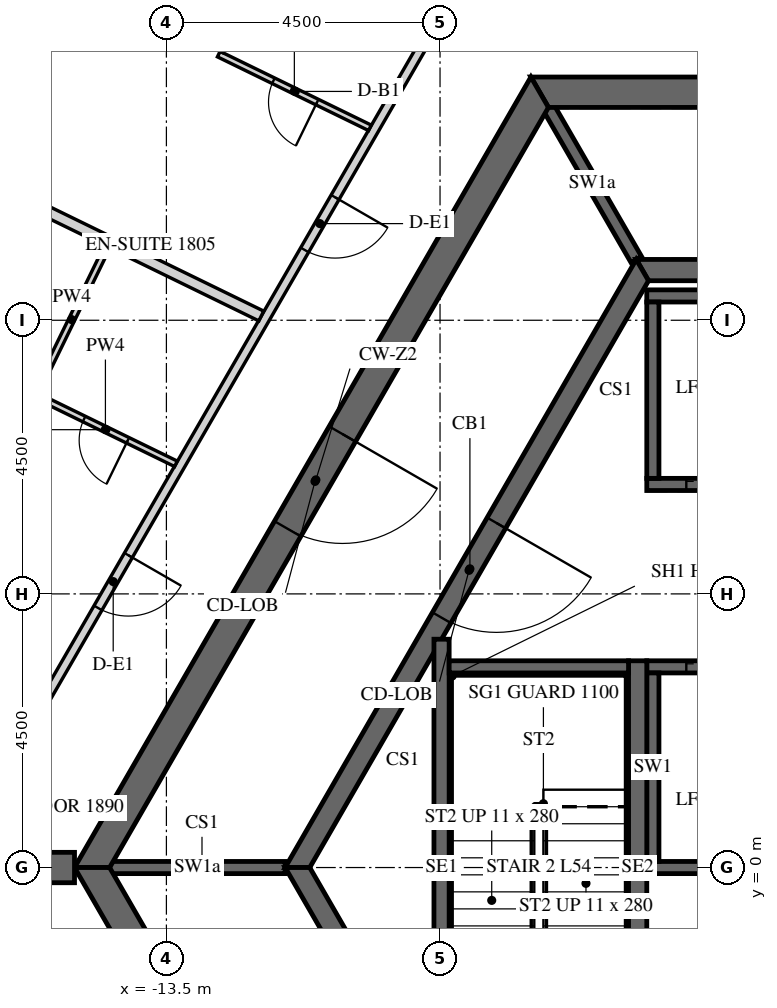
"""IFC4 building model, lengths in metres.
Left out: names, types, materials, properties, quantities, classifications, styles, units other than length and angle.
Written with IfcOpenShell. Run it as: python <this file> out.ifc"""

import sys

from ifc_helpers import new_model, si_unit, direction, frame, frame_2d, origin, place, context, subcontext, project, spatial, polyline, rectangle, outline, extrude, element, fill, save


model = new_model("IFC4")
c1 = context("Model", 3, precision=1e-05, world=origin(), true_north=direction((0.0, 1.0)))
c2 = subcontext(c1, "Body", "Model", "MODEL_VIEW")
j1 = project(units=[si_unit("LENGTHUNIT", "METRE"), si_unit("PLANEANGLEUNIT", "RADIAN")], contexts=[c1])
p1 = place(None, origin())
s1 = spatial("IfcSite", under=j1, at=p1, CompositionType="ELEMENT")
p2 = place(p1, origin())
s2 = spatial("IfcBuilding", under=s1, at=p2, CompositionType="ELEMENT")
p3 = place(p2, frame((0.0, 0.0, 226.8)))
s3 = spatial("IfcBuildingStorey", under=s2, at=p3, CompositionType="ELEMENT", Elevation=226.8)
p4 = place(p3, frame((-7.361, 12.75, -0.15), z_axis=(0.0, 0.0, 1.0), x_axis=(-0.50000571537, -0.866022103989, 0.0)))
e1 = element("IfcWall", 1, at=p4, inside=s3, PredefinedType="SHEAR", context=c2, shape_type="SweptSolid", body=[
    extrude(outline(polyline([(-0.144, -0.25), (14.867, -0.25), (14.578, 0.25), (0.144, 0.25), (-0.144, -0.25)])), origin(), (0.0, 0.0, 1.0), 3.9),
])
p5 = place(p4, frame((6.49, 0.0, 0.15)))
e2 = element("IfcOpeningElement", 2, at=p5, cuts=e1, PredefinedType="OPENING", context=c2, shape_type="SweptSolid", body=[
    extrude(rectangle(XDim=1.8, YDim=2.4, at=frame_2d((0.9, 1.2))), frame((0.0, 0.26, 0.0), z_axis=(0.0, -1.0, 0.0), x_axis=(1.0, 0.0, 0.0)), (0.0, 0.0, 1.0), 0.52),
])
p6 = place(p3, frame((-14.722, 0.0, -0.15), z_axis=(0.0, 0.0, 1.0), x_axis=(0.50000571537, -0.866022103989, 0.0)))
e3 = element("IfcWall", 3, at=p6, inside=s3, PredefinedType="SHEAR", context=c2, shape_type="SweptSolid", body=[
    extrude(outline(polyline([(-0.144, -0.25), (14.867, -0.25), (14.578, 0.25), (0.144, 0.25), (-0.144, -0.25)])), origin(), (0.0, 0.0, 1.0), 3.9),
])
p7 = place(p6, frame((6.432, 0.0, 0.15)))
e4 = element("IfcOpeningElement", 4, at=p7, cuts=e3, PredefinedType="OPENING", context=c2, shape_type="SweptSolid", body=[
    extrude(rectangle(XDim=1.8, YDim=2.4, at=frame_2d((0.9, 1.2))), frame((0.0, 0.26, 0.0), z_axis=(0.0, -1.0, 0.0), x_axis=(1.0, 0.0, 0.0)), (0.0, 0.0, 1.0), 0.52),
])
p8 = place(p3, frame((7.361, 12.75, -0.15), z_axis=(0.0, 0.0, 1.0), x_axis=(-1.0, 0.0, 0.0)))
e5 = element("IfcWall", 5, at=p8, inside=s3, PredefinedType="SHEAR", context=c2, shape_type="SweptSolid", body=[
    extrude(outline(polyline([(-0.144, -0.25), (14.866, -0.25), (14.578, 0.25), (0.144, 0.25), (-0.144, -0.25)])), origin(), (0.0, 0.0, 1.0), 3.9),
])
p9 = place(p8, frame((6.761, 0.0, 0.15)))
e6 = element("IfcOpeningElement", 6, at=p9, cuts=e5, PredefinedType="OPENING", context=c2, shape_type="SweptSolid", body=[
    extrude(rectangle(XDim=1.2, YDim=2.4, at=frame_2d((0.6, 1.2))), frame((0.0, 0.26, 0.0), z_axis=(0.0, -1.0, 0.0), x_axis=(1.0, 0.0, 0.0)), (0.0, 0.0, 1.0), 0.52),
])
p10 = place(p3, frame((-15.011, 0.0, -0.15), z_axis=(0.0, 0.0, 1.0), x_axis=(-1.0, 0.0, 0.0)))
e7 = element("IfcWall", 7, at=p10, inside=s3, PredefinedType="SHEAR", context=c2, shape_type="SweptSolid", body=[
    extrude(rectangle(XDim=15.424, YDim=0.5, at=frame_2d((7.712, 0.0))), origin(), (0.0, 0.0, 1.0), 3.9),
])
p11 = place(p10, frame((6.812, 0.0, 0.15)))
e8 = element("IfcOpeningElement", 8, at=p11, cuts=e7, PredefinedType="OPENING", context=c2, shape_type="SweptSolid", body=[
    extrude(rectangle(XDim=1.8, YDim=2.4, at=frame_2d((0.9, 1.2))), frame((0.0, 0.26, 0.0), z_axis=(0.0, -1.0, 0.0), x_axis=(1.0, 0.0, 0.0)), (0.0, 0.0, 1.0), 0.52),
])
p12 = place(p3, frame((-5.673, 9.825, -0.15), z_axis=(0.0, 0.0, 1.0), x_axis=(-0.499995046907, -0.866028263435, 0.0)))
e9 = element("IfcWall", 9, at=p12, inside=s3, PredefinedType="SHEAR", context=c2, shape_type="SweptSolid", body=[
    extrude(outline(polyline([(-0.101, -0.175), (11.446, -0.175), (11.244, 0.175), (0.101, 0.175), (-0.101, -0.175)])), origin(), (0.0, 0.0, 1.0), 3.9),
])
p13 = place(p12, frame((4.801, 0.0, 0.15)))
e10 = element("IfcOpeningElement", 10, at=p13, cuts=e9, PredefinedType="OPENING", context=c2, shape_type="SweptSolid", body=[
    extrude(rectangle(XDim=1.8, YDim=2.4, at=frame_2d((0.9, 1.2))), frame((0.0, 0.185, 0.0), z_axis=(0.0, -1.0, 0.0), x_axis=(1.0, 0.0, 0.0)), (0.0, 0.0, 1.0), 0.37),
])
p14 = place(p3, frame((-11.345, 0.0, -0.15), z_axis=(0.0, 0.0, 1.0), x_axis=(0.499995046907, -0.866028263435, 0.0)))
e11 = element("IfcWall", 11, at=p14, inside=s3, PredefinedType="SHEAR", context=c2, shape_type="SweptSolid", body=[
    extrude(outline(polyline([(-0.101, -0.175), (11.446, -0.175), (11.244, 0.175), (0.101, 0.175), (-0.101, -0.175)])), origin(), (0.0, 0.0, 1.0), 3.9),
])
p15 = place(p14, frame((4.744, 0.0, 0.15)))
e12 = element("IfcOpeningElement", 12, at=p15, cuts=e11, PredefinedType="OPENING", context=c2, shape_type="SweptSolid", body=[
    extrude(rectangle(XDim=1.8, YDim=2.4, at=frame_2d((0.9, 1.2))), frame((0.0, 0.185, 0.0), z_axis=(0.0, -1.0, 0.0), x_axis=(1.0, 0.0, 0.0)), (0.0, 0.0, 1.0), 0.37),
])
p16 = place(p3, frame((5.673, 9.825, -0.15), z_axis=(0.0, 0.0, 1.0), x_axis=(-1.0, 0.0, 0.0)))
e13 = element("IfcWall", 13, at=p16, inside=s3, PredefinedType="SHEAR", context=c2, shape_type="SweptSolid", body=[
    extrude(outline(polyline([(-0.101, -0.175), (11.446, -0.175), (11.244, 0.175), (0.101, 0.175), (-0.101, -0.175)])), origin(), (0.0, 0.0, 1.0), 3.9),
])
p17 = place(p3, frame((-5.6, 6.3, -0.25), z_axis=(0.0, 0.0, 1.0), x_axis=(1.0, 0.0, 0.0)))
e14 = element("IfcWall", 14, at=p17, inside=s3, PredefinedType="SHEAR", context=c2, shape_type="SweptSolid", body=[
    extrude(rectangle(XDim=11.2, YDim=0.2, at=frame_2d((5.6, 0.0))), origin(), (0.0, 0.0, 1.0), 3.9),
])
p18 = place(p17, frame((8.45, 0.0, 0.25)))
e15 = element("IfcOpeningElement", 15, at=p18, cuts=e14, PredefinedType="OPENING", context=c2, shape_type="SweptSolid", body=[
    extrude(rectangle(XDim=0.9, YDim=2.1, at=frame_2d((0.45, 1.05))), frame((0.0, 0.11, 0.0), z_axis=(0.0, -1.0, 0.0), x_axis=(1.0, 0.0, 0.0)), (0.0, 0.0, 1.0), 0.22),
])
p19 = place(p17, frame((0.65, 0.0, 0.25)))
e16 = element("IfcOpeningElement", 16, at=p19, cuts=e14, PredefinedType="OPENING", context=c2, shape_type="SweptSolid", body=[
    extrude(rectangle(XDim=1.1, YDim=2.1, at=frame_2d((0.55, 1.05))), frame((0.0, 0.11, 0.0), z_axis=(0.0, -1.0, 0.0), x_axis=(1.0, 0.0, 0.0)), (0.0, 0.0, 1.0), 0.22),
])
p20 = place(p17, frame((2.85, 0.0, 0.25)))
e17 = element("IfcOpeningElement", 17, at=p20, cuts=e14, PredefinedType="OPENING", context=c2, shape_type="SweptSolid", body=[
    extrude(rectangle(XDim=1.1, YDim=2.1, at=frame_2d((0.55, 1.05))), frame((0.0, 0.11, 0.0), z_axis=(0.0, -1.0, 0.0), x_axis=(1.0, 0.0, 0.0)), (0.0, 0.0, 1.0), 0.22),
])
p21 = place(p17, frame((5.05, 0.0, 0.25)))
e18 = element("IfcOpeningElement", 18, at=p21, cuts=e14, PredefinedType="OPENING", context=c2, shape_type="SweptSolid", body=[
    extrude(rectangle(XDim=1.1, YDim=2.1, at=frame_2d((0.55, 1.05))), frame((0.0, 0.11, 0.0), z_axis=(0.0, -1.0, 0.0), x_axis=(1.0, 0.0, 0.0)), (0.0, 0.0, 1.0), 0.22),
])
p22 = place(p3, frame((-5.6, 9.4, -0.25), z_axis=(0.0, 0.0, 1.0), x_axis=(1.0, 0.0, 0.0)))
e19 = element("IfcWall", 19, at=p22, inside=s3, PredefinedType="SHEAR", context=c2, shape_type="SweptSolid", body=[
    extrude(rectangle(XDim=11.2, YDim=0.2, at=frame_2d((5.6, 0.0))), origin(), (0.0, 0.0, 1.0), 3.9),
])
p23 = place(p3, frame((-5.5, 6.4, -0.25), z_axis=(0.0, 0.0, 1.0), x_axis=(0.0, 1.0, 0.0)))
e20 = element("IfcWall", 20, at=p23, inside=s3, PredefinedType="SHEAR", context=c2, shape_type="SweptSolid", body=[
    extrude(rectangle(XDim=2.9, YDim=0.2, at=frame_2d((1.45, 0.0))), origin(), (0.0, 0.0, 1.0), 3.9),
])
p24 = place(p3, frame((-5.6, 3.3, -0.25), z_axis=(0.0, 0.0, 1.0), x_axis=(1.0, 0.0, 0.0)))
e21 = element("IfcWall", 21, at=p24, inside=s3, PredefinedType="SHEAR", context=c2, shape_type="SweptSolid", body=[
    extrude(rectangle(XDim=11.2, YDim=0.2, at=frame_2d((5.6, 0.0))), origin(), (0.0, 0.0, 1.0), 3.9),
])
p25 = place(p24, frame((0.65, 0.0, 0.25)))
e22 = element("IfcOpeningElement", 22, at=p25, cuts=e21, PredefinedType="OPENING", context=c2, shape_type="SweptSolid", body=[
    extrude(rectangle(XDim=1.1, YDim=2.1, at=frame_2d((0.55, 1.05))), frame((0.0, 0.11, 0.0), z_axis=(0.0, -1.0, 0.0), x_axis=(1.0, 0.0, 0.0)), (0.0, 0.0, 1.0), 0.22),
])
p26 = place(p24, frame((2.85, 0.0, 0.25)))
e23 = element("IfcOpeningElement", 23, at=p26, cuts=e21, PredefinedType="OPENING", context=c2, shape_type="SweptSolid", body=[
    extrude(rectangle(XDim=1.1, YDim=2.1, at=frame_2d((0.55, 1.05))), frame((0.0, 0.11, 0.0), z_axis=(0.0, -1.0, 0.0), x_axis=(1.0, 0.0, 0.0)), (0.0, 0.0, 1.0), 0.22),
])
p27 = place(p24, frame((5.05, 0.0, 0.25)))
e24 = element("IfcOpeningElement", 24, at=p27, cuts=e21, PredefinedType="OPENING", context=c2, shape_type="SweptSolid", body=[
    extrude(rectangle(XDim=1.1, YDim=2.1, at=frame_2d((0.55, 1.05))), frame((0.0, 0.11, 0.0), z_axis=(0.0, -1.0, 0.0), x_axis=(1.0, 0.0, 0.0)), (0.0, 0.0, 1.0), 0.22),
])
p28 = place(p24, frame((7.25, 0.0, 0.25)))
e25 = element("IfcOpeningElement", 25, at=p28, cuts=e21, PredefinedType="OPENING", context=c2, shape_type="SweptSolid", body=[
    extrude(rectangle(XDim=1.1, YDim=2.1, at=frame_2d((0.55, 1.05))), frame((0.0, 0.11, 0.0), z_axis=(0.0, -1.0, 0.0), x_axis=(1.0, 0.0, 0.0)), (0.0, 0.0, 1.0), 0.22),
])
p29 = place(p24, frame((9.45, 0.0, 0.25)))
e26 = element("IfcOpeningElement", 26, at=p29, cuts=e21, PredefinedType="OPENING", context=c2, shape_type="SweptSolid", body=[
    extrude(rectangle(XDim=1.1, YDim=2.1, at=frame_2d((0.55, 1.05))), frame((0.0, 0.11, 0.0), z_axis=(0.0, -1.0, 0.0), x_axis=(1.0, 0.0, 0.0)), (0.0, 0.0, 1.0), 0.22),
])
p30 = place(p3, frame((-5.6, 0.0, -0.25), z_axis=(0.0, 0.0, 1.0), x_axis=(1.0, 0.0, 0.0)))
e27 = element("IfcWall", 27, at=p30, inside=s3, PredefinedType="SHEAR", context=c2, shape_type="SweptSolid", body=[
    extrude(rectangle(XDim=11.2, YDim=0.2, at=frame_2d((5.6, 0.0))), origin(), (0.0, 0.0, 1.0), 3.9),
])
p31 = place(p3, frame((-5.5, 0.1, -0.25), z_axis=(0.0, 0.0, 1.0), x_axis=(0.0, 1.0, 0.0)))
e28 = element("IfcWall", 28, at=p31, inside=s3, PredefinedType="SHEAR", context=c2, shape_type="SweptSolid", body=[
    extrude(rectangle(XDim=3.1, YDim=0.2, at=frame_2d((1.55, 0.0))), origin(), (0.0, 0.0, 1.0), 3.9),
])
for number, where, z_axis, x_axis in (
    (29, (-5.773, 10.0, -0.15), (0.0, 0.0, 1.0), (-0.5, 0.866, 0.0)),
    (30, (-11.547, 0.0, -0.15), (0.0, 0.0, 1.0), (-1.0, 0.0, 0.0)),
):
    element("IfcWall", number, at=place(p3, frame(where, z_axis=z_axis, x_axis=x_axis)), inside=s3, PredefinedType="SHEAR", context=c2, shape_type="SweptSolid", body=[
        extrude(rectangle(XDim=2.887, YDim=0.2, at=frame_2d((1.443, 0.0))), origin(), (0.0, 0.0, 1.0), 3.9),
    ])
p32 = place(p3, frame((-5.75, -3.4, -0.25), z_axis=(0.0, 0.0, 1.0), x_axis=(0.0, 1.0, 0.0)))
e31 = element("IfcWall", 31, at=p32, inside=s3, PredefinedType="SHEAR", context=c2, shape_type="SweptSolid", body=[
    extrude(rectangle(XDim=6.8, YDim=0.3, at=frame_2d((3.4, 0.0))), origin(), (0.0, 0.0, 1.0), 3.9),
])
p33 = place(p3, frame((-8.975, -3.755, -0.25), z_axis=(0.0, 0.0, 1.0), x_axis=(0.0, 1.0, 0.0)))
e32 = element("IfcWall", 32, at=p33, inside=s3, PredefinedType="SHEAR", context=c2, shape_type="SweptSolid", body=[
    extrude(rectangle(XDim=7.51, YDim=0.25, at=frame_2d((3.755, 0.0))), origin(), (0.0, 0.0, 1.0), 3.9),
])
p34 = place(p3, frame((-8.85, 3.3, -0.25), z_axis=(0.0, 0.0, 1.0), x_axis=(1.0, 0.0, 0.0)))
e33 = element("IfcWall", 33, at=p34, inside=s3, PredefinedType="SHEAR", context=c2, shape_type="SweptSolid", body=[
    extrude(rectangle(XDim=2.95, YDim=0.2, at=frame_2d((1.475, 0.0))), origin(), (0.0, 0.0, 1.0), 3.9),
])
p35 = place(p3, frame((-8.588, 14.725, 0.0), z_axis=(0.0, 0.0, 1.0), x_axis=(-0.499999926766, -0.866025446066, 0.0)))
e34 = element("IfcWall", 34, at=p35, inside=s3, PredefinedType="PARTITIONING", context=c2, shape_type="SweptSolid", body=[
    extrude(rectangle(XDim=13.786, YDim=0.15, at=frame_2d((6.893, 0.0))), origin(), (0.0, 0.0, 1.0), 2.988),
])
p36 = place(p35, frame((4.276, 0.0, 0.0)))
e35 = element("IfcOpeningElement", 35, at=p36, cuts=e34, PredefinedType="OPENING", context=c2, shape_type="SweptSolid", body=[
    extrude(rectangle(XDim=1.0, YDim=2.1, at=frame_2d((0.5, 1.05))), frame((0.0, 0.085, 0.0), z_axis=(0.0, -1.0, 0.0), x_axis=(1.0, 0.0, 0.0)), (0.0, 0.0, 1.0), 0.17),
])
p37 = place(p35, frame((11.073, 0.0, 0.0)))
e36 = element("IfcOpeningElement", 36, at=p37, cuts=e34, PredefinedType="OPENING", context=c2, shape_type="SweptSolid", body=[
    extrude(rectangle(XDim=1.0, YDim=2.1, at=frame_2d((0.5, 1.05))), frame((0.0, 0.085, 0.0), z_axis=(0.0, -1.0, 0.0), x_axis=(1.0, 0.0, 0.0)), (0.0, 0.0, 1.0), 0.17),
])
p38 = place(p3, frame((-10.153, 12.164, 0.0), z_axis=(0.0, 0.0, 1.0), x_axis=(-0.898780323471, 0.438399281638, 0.0)))
e37 = element("IfcWall", 37, at=p38, inside=s3, PredefinedType="PARTITIONING", context=c2, shape_type="SweptSolid", body=[
    extrude(rectangle(XDim=2.766, YDim=0.1, at=frame_2d((1.383, 0.0))), origin(), (0.0, 0.0, 1.0), 2.988),
])
p39 = place(p38, frame((0.966, 0.0, 0.0)))
e38 = element("IfcOpeningElement", 38, at=p39, cuts=e37, PredefinedType="OPENING", context=c2, shape_type="SweptSolid", body=[
    extrude(rectangle(XDim=0.8, YDim=2.1, at=frame_2d((0.4, 1.05))), frame((0.0, 0.06, 0.0), z_axis=(0.0, -1.0, 0.0), x_axis=(1.0, 0.0, 0.0)), (0.0, 0.0, 1.0), 0.12),
])
p40 = place(p3, frame((-12.617, 13.422, 0.0), z_axis=(0.0, 0.0, 1.0), x_axis=(0.438298773825, 0.898829341345, 0.0)))
e39 = element("IfcWall", 39, at=p40, inside=s3, PredefinedType="PARTITIONING", context=c2, shape_type="SweptSolid", body=[
    extrude(rectangle(XDim=2.35, YDim=0.1, at=frame_2d((1.175, 0.0))), origin(), (0.0, 0.0, 1.0), 2.988),
])
p41 = place(p3, frame((-23.393, 14.656, 0.0), z_axis=(0.0, 0.0, 1.0), x_axis=(0.898790356386, -0.438378712152, 0.0)))
e40 = element("IfcWall", 40, at=p41, inside=s3, PredefinedType="PARTITIONING", context=c2, shape_type="SweptSolid", body=[
    extrude(rectangle(XDim=12.743, YDim=0.18, at=frame_2d((6.372, 0.0))), origin(), (0.0, 0.0, 1.0), 2.988),
])
p42 = place(p3, frame((-13.343, 6.639, 0.0), z_axis=(0.0, 0.0, 1.0), x_axis=(-0.898792082907, 0.438375172318, 0.0)))
e41 = element("IfcWall", 41, at=p42, inside=s3, PredefinedType="PARTITIONING", context=c2, shape_type="SweptSolid", body=[
    extrude(rectangle(XDim=2.581, YDim=0.1, at=frame_2d((1.291, 0.0))), origin(), (0.0, 0.0, 1.0), 2.988),
])
p43 = place(p42, frame((0.881, 0.0, 0.0)))
e42 = element("IfcOpeningElement", 42, at=p43, cuts=e41, PredefinedType="OPENING", context=c2, shape_type="SweptSolid", body=[
    extrude(rectangle(XDim=0.8, YDim=2.1, at=frame_2d((0.4, 1.05))), frame((0.0, 0.06, 0.0), z_axis=(0.0, -1.0, 0.0), x_axis=(1.0, 0.0, 0.0)), (0.0, 0.0, 1.0), 0.12),
])
p44 = place(p3, frame((-15.641, 7.815, 0.0), z_axis=(0.0, 0.0, 1.0), x_axis=(0.438380229518, 0.898789616299, 0.0)))
e43 = element("IfcWall", 43, at=p44, inside=s3, PredefinedType="PARTITIONING", context=c2, shape_type="SweptSolid", body=[
    extrude(rectangle(XDim=2.66, YDim=0.1, at=frame_2d((1.33, 0.0))), origin(), (0.0, 0.0, 1.0), 2.988),
])
p45 = place(p5, origin())
e44 = element("IfcDoor", 44, at=p45, inside=s3, OperationType="DOUBLE_DOOR_SINGLE_SWING", PredefinedType="DOOR", context=c2, shape_type="SweptSolid", body=[
    extrude(rectangle(XDim=1.8, YDim=2.4, at=frame_2d((0.9, 1.2))), frame((0.0, 0.025, 0.0), z_axis=(0.0, -1.0, 0.0), x_axis=(1.0, 0.0, 0.0)), (0.0, 0.0, 1.0), 0.05),
])
fill(e2, e44)
p46 = place(p13, origin())
e45 = element("IfcDoor", 45, at=p46, inside=s3, OperationType="DOUBLE_DOOR_SINGLE_SWING", PredefinedType="DOOR", context=c2, shape_type="SweptSolid", body=[
    extrude(rectangle(XDim=1.8, YDim=2.4, at=frame_2d((0.9, 1.2))), frame((0.0, 0.025, 0.0), z_axis=(0.0, -1.0, 0.0), x_axis=(1.0, 0.0, 0.0)), (0.0, 0.0, 1.0), 0.05),
])
fill(e10, e45)
p47 = place(p19, origin())
e46 = element("IfcDoor", 46, at=p47, inside=s3, OperationType="SLIDING_TO_LEFT", PredefinedType="DOOR", context=c2, shape_type="SweptSolid", body=[
    extrude(rectangle(XDim=1.1, YDim=2.1, at=frame_2d((0.55, 1.05))), frame((0.0, 0.025, 0.0), z_axis=(0.0, -1.0, 0.0), x_axis=(1.0, 0.0, 0.0)), (0.0, 0.0, 1.0), 0.05),
])
fill(e16, e46)
p48 = place(p25, origin())
e47 = element("IfcDoor", 47, at=p48, inside=s3, OperationType="SLIDING_TO_LEFT", PredefinedType="DOOR", context=c2, shape_type="SweptSolid", body=[
    extrude(rectangle(XDim=1.1, YDim=2.1, at=frame_2d((0.55, 1.05))), frame((0.0, 0.025, 0.0), z_axis=(0.0, -1.0, 0.0), x_axis=(1.0, 0.0, 0.0)), (0.0, 0.0, 1.0), 0.05),
])
fill(e22, e47)
p49 = place(p36, origin())
e48 = element("IfcDoor", 48, at=p49, inside=s3, OperationType="SINGLE_SWING_LEFT", PredefinedType="DOOR", context=c2, shape_type="SweptSolid", body=[
    extrude(rectangle(XDim=1.0, YDim=2.1, at=frame_2d((0.5, 1.05))), frame((0.0, 0.025, 0.0), z_axis=(0.0, -1.0, 0.0), x_axis=(1.0, 0.0, 0.0)), (0.0, 0.0, 1.0), 0.05),
])
fill(e35, e48)
p50 = place(p39, origin())
e49 = element("IfcDoor", 49, at=p50, inside=s3, OperationType="SINGLE_SWING_LEFT", PredefinedType="DOOR", context=c2, shape_type="SweptSolid", body=[
    extrude(rectangle(XDim=0.8, YDim=2.1, at=frame_2d((0.4, 1.05))), frame((0.0, 0.025, 0.0), z_axis=(0.0, -1.0, 0.0), x_axis=(1.0, 0.0, 0.0)), (0.0, 0.0, 1.0), 0.05),
])
fill(e38, e49)
p51 = place(p37, origin())
e50 = element("IfcDoor", 50, at=p51, inside=s3, OperationType="SINGLE_SWING_LEFT", PredefinedType="DOOR", context=c2, shape_type="SweptSolid", body=[
    extrude(rectangle(XDim=1.0, YDim=2.1, at=frame_2d((0.5, 1.05))), frame((0.0, 0.025, 0.0), z_axis=(0.0, -1.0, 0.0), x_axis=(1.0, 0.0, 0.0)), (0.0, 0.0, 1.0), 0.05),
])
fill(e36, e50)
p52 = place(p43, origin())
e51 = element("IfcDoor", 51, at=p52, inside=s3, OperationType="SINGLE_SWING_RIGHT", PredefinedType="DOOR", context=c2, shape_type="SweptSolid", body=[
    extrude(rectangle(XDim=0.8, YDim=2.1, at=frame_2d((0.4, 1.05))), frame((0.0, 0.025, 0.0), z_axis=(0.0, -1.0, 0.0), x_axis=(1.0, 0.0, 0.0)), (0.0, 0.0, 1.0), 0.05),
])
fill(e42, e51)
save(model, sys.argv[1])
